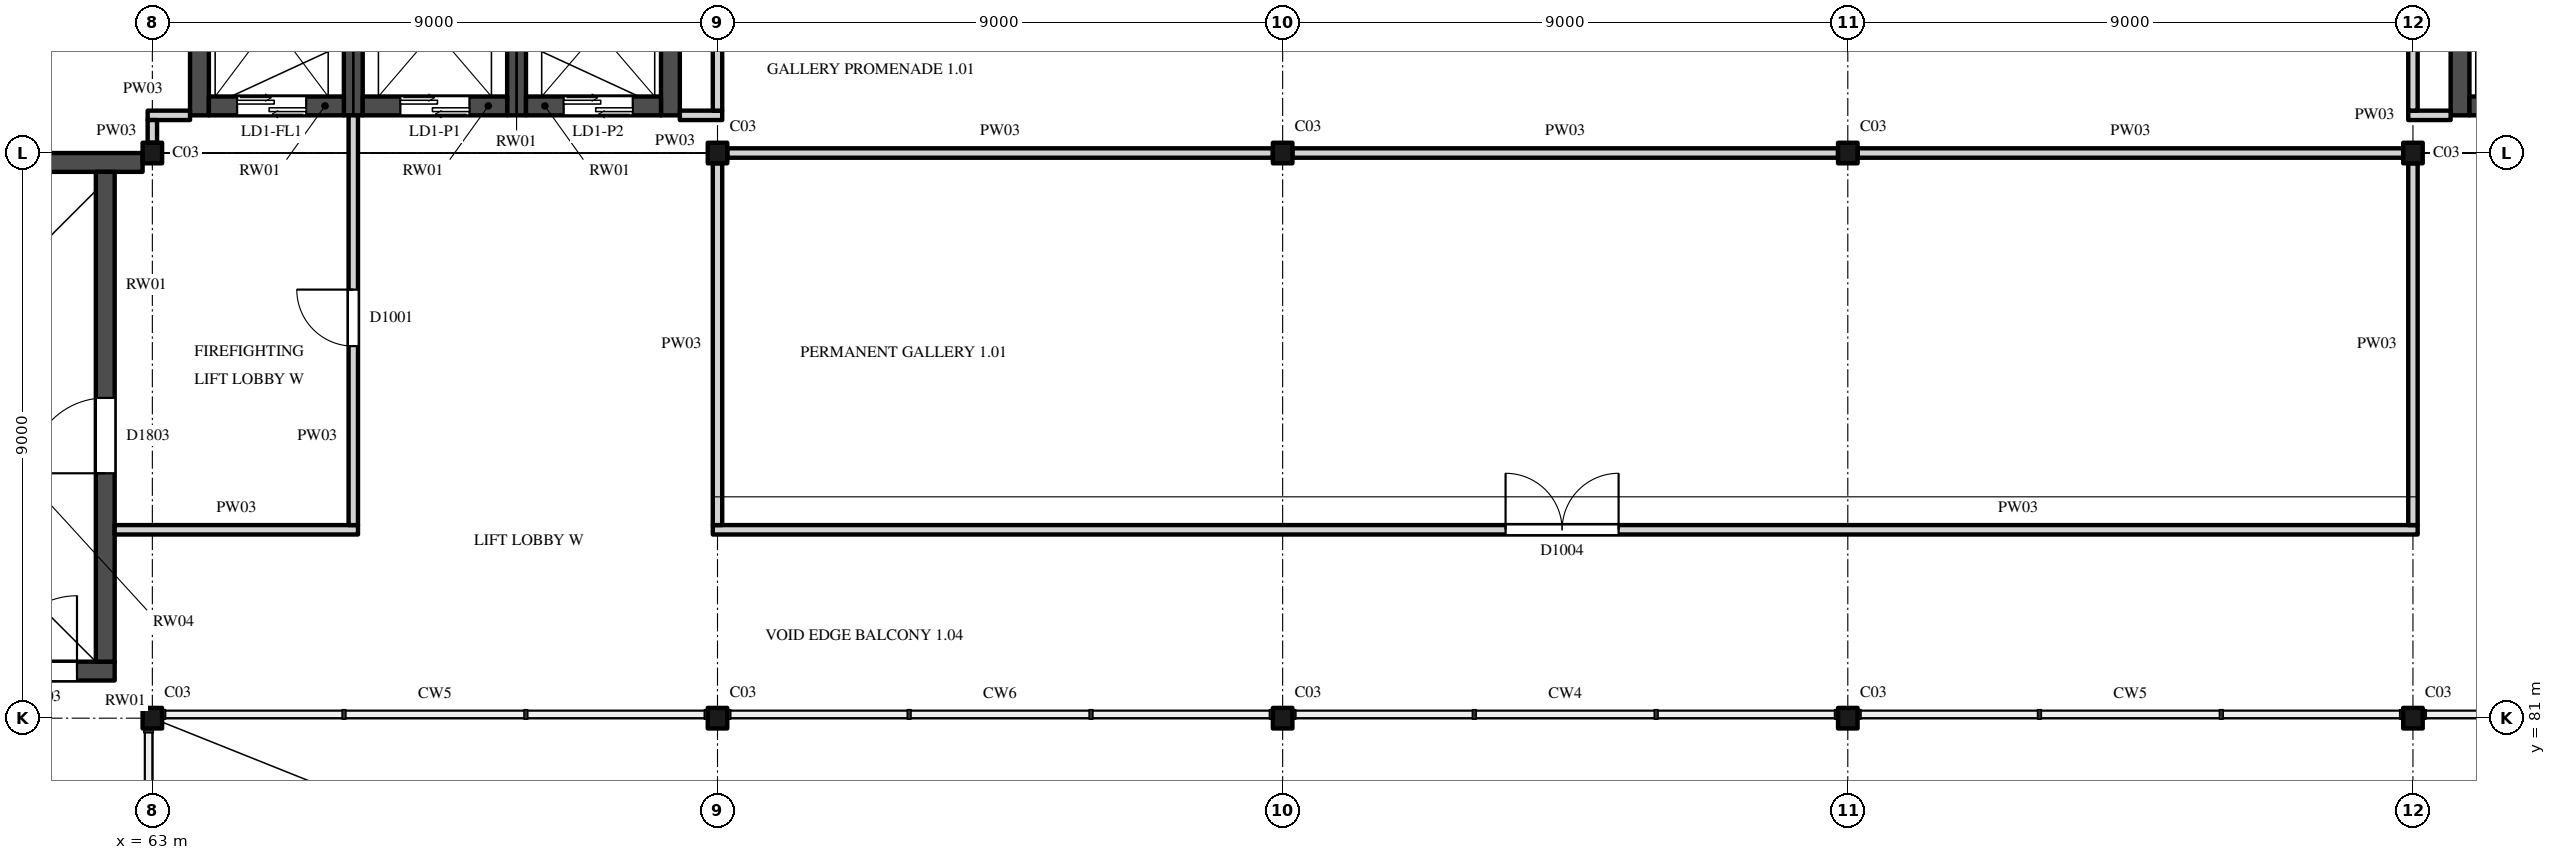
"""IFC4 building model, lengths in metres.
Left out: names, types, materials, properties, quantities, classifications, styles, units other than length and angle.
Written with IfcOpenShell. Run it as: python <this file> out.ifc"""

import sys

from ifc_helpers import new_model, si_unit, direction, frame, frame_2d, origin, origin_2d, place, context, subcontext, project, spatial, rectangle, i_section, extrude, element, fill, save


model = new_model("IFC4")
c1 = context("Model", 3, precision=1e-05, world=origin(), true_north=direction((0.0, 1.0)))
c2 = subcontext(c1, "Body", "Model", "MODEL_VIEW")
j1 = project(units=[si_unit("LENGTHUNIT", "METRE"), si_unit("PLANEANGLEUNIT", "RADIAN")], contexts=[c1])
p1 = place(None, origin())
s1 = spatial("IfcSite", under=j1, at=p1, CompositionType="ELEMENT")
p2 = place(p1, origin())
s2 = spatial("IfcBuilding", under=s1, at=p2, CompositionType="ELEMENT")
p3 = place(p2, frame((0.0, 0.0, 6.0)))
s3 = spatial("IfcBuildingStorey", under=s2, at=p3, CompositionType="ELEMENT", Elevation=6.0)
for number, where, z_axis, x_axis in (
    (1, (63.0, 81.0, 0.0), (0.0, 0.0, 1.0), (1.0, 0.0, 0.0)),
    (2, (72.0, 81.0, 0.0), (0.0, 0.0, 1.0), (1.0, 0.0, 0.0)),
    (3, (81.0, 81.0, 0.0), (0.0, 0.0, 1.0), (1.0, 0.0, 0.0)),
    (4, (90.0, 81.0, 0.0), (0.0, 0.0, 1.0), (1.0, 0.0, 0.0)),
    (5, (99.0, 81.0, 0.0), (0.0, 0.0, 1.0), (1.0, 0.0, 0.0)),
    (6, (63.0, 90.0, 0.0), (0.0, 0.0, 1.0), (1.0, 0.0, 0.0)),
    (7, (72.0, 90.0, 0.0), (0.0, 0.0, 1.0), (1.0, 0.0, 0.0)),
    (8, (81.0, 90.0, 0.0), (0.0, 0.0, 1.0), (1.0, 0.0, 0.0)),
    (9, (90.0, 90.0, 0.0), (0.0, 0.0, 1.0), (1.0, 0.0, 0.0)),
    (10, (99.0, 90.0, 0.0), (0.0, 0.0, 1.0), (1.0, 0.0, 0.0)),
):
    element("IfcColumn", number, at=place(p3, frame(where, z_axis=z_axis, x_axis=x_axis)), inside=s3, PredefinedType="COLUMN", context=c2, shape_type="SweptSolid", body=[
        extrude(i_section(OverallWidth=0.311, OverallDepth=0.327, WebThickness=0.016, FlangeThickness=0.025, FilletRadius=0.017, at=origin_2d()), origin(), (0.0, 0.0, 1.0), 5.0),
    ])
p4 = place(p3, frame((54.3, 81.75, 0.0), z_axis=(0.0, 0.0, 1.0), x_axis=(1.0, 0.0, 0.0)))
e11 = element("IfcWall", 11, at=p4, inside=s3, PredefinedType="SHEAR", context=c2, shape_type="SweptSolid", body=[
    extrude(rectangle(XDim=8.1, YDim=0.3, at=frame_2d((4.05, 0.0))), origin(), (0.0, 0.0, 1.0), 5.0),
])
p5 = place(p4, frame((6.3, 0.0, 0.0)))
e12 = element("IfcOpeningElement", 12, at=p5, cuts=e11, PredefinedType="OPENING", context=c2, shape_type="SweptSolid", body=[
    extrude(rectangle(XDim=1.2, YDim=2.1, at=frame_2d((0.6, 1.05))), frame((0.0, 0.16, 0.0), z_axis=(0.0, -1.0, 0.0), x_axis=(1.0, 0.0, 0.0)), (0.0, 0.0, 1.0), 0.32),
])
p6 = place(p3, frame((54.3, 89.85, 0.0), z_axis=(0.0, 0.0, 1.0), x_axis=(1.0, 0.0, 0.0)))
e13 = element("IfcWall", 13, at=p6, inside=s3, PredefinedType="SHEAR", context=c2, shape_type="SweptSolid", body=[
    extrude(rectangle(XDim=8.544, YDim=0.3, at=frame_2d((4.272, 0.0))), origin(), (0.0, 0.0, 1.0), 5.0),
])
p7 = place(p3, frame((62.25, 81.9, 0.0), z_axis=(0.0, 0.0, 1.0), x_axis=(0.0, 1.0, 0.0)))
e14 = element("IfcWall", 14, at=p7, inside=s3, PredefinedType="SHEAR", context=c2, shape_type="SweptSolid", body=[
    extrude(rectangle(XDim=7.8, YDim=0.3, at=frame_2d((3.9, 0.0))), origin(), (0.0, 0.0, 1.0), 5.0),
])
p8 = place(p7, frame((3.0, 0.0, 0.0)))
e15 = element("IfcOpeningElement", 15, at=p8, cuts=e14, PredefinedType="OPENING", context=c2, shape_type="SweptSolid", body=[
    extrude(rectangle(XDim=1.2, YDim=2.1, at=frame_2d((0.6, 1.05))), frame((0.0, 0.16, 0.0), z_axis=(0.0, -1.0, 0.0), x_axis=(1.0, 0.0, 0.0)), (0.0, 0.0, 1.0), 0.32),
])
for number, where, z_axis, x_axis in (
    (16, (63.75, 90.6, 0.0), (0.0, 0.0, 1.0), (0.0, 1.0, 0.0)),
    (17, (66.2, 90.6, 0.0), (0.0, 0.0, 1.0), (0.0, 1.0, 0.0)),
    (18, (68.8, 90.6, 0.0), (0.0, 0.0, 1.0), (0.0, 1.0, 0.0)),
    (19, (71.25, 90.6, 0.0), (0.0, 0.0, 1.0), (0.0, 1.0, 0.0)),
):
    element("IfcWall", number, at=place(p3, frame(where, z_axis=z_axis, x_axis=x_axis)), inside=s3, PredefinedType="SHEAR", context=c2, shape_type="SweptSolid", body=[
        extrude(rectangle(XDim=3.6, YDim=0.3, at=frame_2d((1.8, 0.0))), origin(), (0.0, 0.0, 1.0), 5.0),
    ])
p9 = place(p3, frame((63.9, 90.75, 0.0), z_axis=(0.0, 0.0, 1.0), x_axis=(1.0, 0.0, 0.0)))
e20 = element("IfcWall", 20, at=p9, inside=s3, PredefinedType="SHEAR", context=c2, shape_type="SweptSolid", body=[
    extrude(rectangle(XDim=2.15, YDim=0.3, at=frame_2d((1.075, 0.0))), origin(), (0.0, 0.0, 1.0), 5.0),
])
p10 = place(p9, frame((0.45, 0.0, 0.0)))
e21 = element("IfcOpeningElement", 21, at=p10, cuts=e20, PredefinedType="OPENING", context=c2, shape_type="SweptSolid", body=[
    extrude(rectangle(XDim=1.1, YDim=2.1, at=frame_2d((0.55, 1.05))), frame((0.0, 0.16, 0.0), z_axis=(0.0, -1.0, 0.0), x_axis=(1.0, 0.0, 0.0)), (0.0, 0.0, 1.0), 0.32),
])
p11 = place(p3, frame((66.35, 90.75, 0.0), z_axis=(0.0, 0.0, 1.0), x_axis=(1.0, 0.0, 0.0)))
e22 = element("IfcWall", 22, at=p11, inside=s3, PredefinedType="SHEAR", context=c2, shape_type="SweptSolid", body=[
    extrude(rectangle(XDim=2.3, YDim=0.3, at=frame_2d((1.15, 0.0))), origin(), (0.0, 0.0, 1.0), 5.0),
])
p12 = place(p11, frame((0.6, 0.0, 0.0)))
e23 = element("IfcOpeningElement", 23, at=p12, cuts=e22, PredefinedType="OPENING", context=c2, shape_type="SweptSolid", body=[
    extrude(rectangle(XDim=1.1, YDim=2.1, at=frame_2d((0.55, 1.05))), frame((0.0, 0.16, 0.0), z_axis=(0.0, -1.0, 0.0), x_axis=(1.0, 0.0, 0.0)), (0.0, 0.0, 1.0), 0.32),
])
p13 = place(p3, frame((68.95, 90.75, 0.0), z_axis=(0.0, 0.0, 1.0), x_axis=(1.0, 0.0, 0.0)))
e24 = element("IfcWall", 24, at=p13, inside=s3, PredefinedType="SHEAR", context=c2, shape_type="SweptSolid", body=[
    extrude(rectangle(XDim=2.15, YDim=0.3, at=frame_2d((1.075, 0.0))), origin(), (0.0, 0.0, 1.0), 5.0),
])
p14 = place(p13, frame((0.6, 0.0, 0.0)))
e25 = element("IfcOpeningElement", 25, at=p14, cuts=e24, PredefinedType="OPENING", context=c2, shape_type="SweptSolid", body=[
    extrude(rectangle(XDim=1.1, YDim=2.1, at=frame_2d((0.55, 1.05))), frame((0.0, 0.16, 0.0), z_axis=(0.0, -1.0, 0.0), x_axis=(1.0, 0.0, 0.0)), (0.0, 0.0, 1.0), 0.32),
])
p15 = place(p3, frame((99.75, 90.6, 0.0), z_axis=(0.0, 0.0, 1.0), x_axis=(0.0, 1.0, 0.0)))
e26 = element("IfcWall", 26, at=p15, inside=s3, PredefinedType="SHEAR", context=c2, shape_type="SweptSolid", body=[
    extrude(rectangle(XDim=3.6, YDim=0.3, at=frame_2d((1.8, 0.0))), origin(), (0.0, 0.0, 1.0), 5.0),
])
p16 = place(p3, frame((99.9, 90.75, 0.0), z_axis=(0.0, 0.0, 1.0), x_axis=(1.0, 0.0, 0.0)))
e27 = element("IfcWall", 27, at=p16, inside=s3, PredefinedType="SHEAR", context=c2, shape_type="SweptSolid", body=[
    extrude(rectangle(XDim=2.15, YDim=0.3, at=frame_2d((1.075, 0.0))), origin(), (0.0, 0.0, 1.0), 5.0),
])
p17 = place(p16, frame((0.45, 0.0, 0.0)))
e28 = element("IfcOpeningElement", 28, at=p17, cuts=e27, PredefinedType="OPENING", context=c2, shape_type="SweptSolid", body=[
    extrude(rectangle(XDim=1.1, YDim=2.1, at=frame_2d((0.55, 1.05))), frame((0.0, 0.16, 0.0), z_axis=(0.0, -1.0, 0.0), x_axis=(1.0, 0.0, 0.0)), (0.0, 0.0, 1.0), 0.32),
])
p18 = place(p3, frame((62.4, 84.0, 0.0), z_axis=(0.0, 0.0, 1.0), x_axis=(1.0, 0.0, 0.0)))
e29 = element("IfcWall", 29, at=p18, inside=s3, PredefinedType="PARTITIONING", context=c2, shape_type="SweptSolid", body=[
    extrude(rectangle(XDim=3.875, YDim=0.15, at=frame_2d((1.938, 0.0))), origin(), (0.0, 0.0, 1.0), 4.473),
])
p19 = place(p3, frame((71.925, 84.0, 0.0), z_axis=(0.0, 0.0, 1.0), x_axis=(1.0, 0.0, 0.0)))
e30 = element("IfcWall", 30, at=p19, inside=s3, PredefinedType="PARTITIONING", context=c2, shape_type="SweptSolid", body=[
    extrude(rectangle(XDim=27.15, YDim=0.15, at=frame_2d((13.575, 0.0))), origin(), (0.0, 0.0, 1.0), 4.473),
])
p20 = place(p19, frame((12.625, 0.0, 0.0)))
e31 = element("IfcOpeningElement", 31, at=p20, cuts=e30, PredefinedType="OPENING", context=c2, shape_type="SweptSolid", body=[
    extrude(rectangle(XDim=1.8, YDim=2.4, at=frame_2d((0.9, 1.2))), frame((0.0, 0.085, 0.0), z_axis=(0.0, -1.0, 0.0), x_axis=(1.0, 0.0, 0.0)), (0.0, 0.0, 1.0), 0.17),
])
for number, where, z_axis, x_axis in (
    (32, (72.156, 90.0, 0.0), (0.0, 0.0, 1.0), (1.0, 0.0, 0.0)),
    (33, (81.156, 90.0, 0.0), (0.0, 0.0, 1.0), (1.0, 0.0, 0.0)),
    (34, (90.156, 90.0, 0.0), (0.0, 0.0, 1.0), (1.0, 0.0, 0.0)),
):
    element("IfcWall", number, at=place(p3, frame(where, z_axis=z_axis, x_axis=x_axis)), inside=s3, PredefinedType="PARTITIONING", context=c2, shape_type="SweptSolid", body=[
        extrude(rectangle(XDim=8.689, YDim=0.15, at=frame_2d((4.344, 0.0))), origin(), (0.0, 0.0, 1.0), 4.466),
    ])
for number, where, z_axis, x_axis in (
    (35, (62.925, 90.6, 0.0), (0.0, 0.0, 1.0), (1.0, 0.0, 0.0)),
    (36, (71.4, 90.6, 0.0), (0.0, 0.0, 1.0), (1.0, 0.0, 0.0)),
    (37, (98.925, 90.6, 0.0), (0.0, 0.0, 1.0), (1.0, 0.0, 0.0)),
):
    element("IfcWall", number, at=place(p3, frame(where, z_axis=z_axis, x_axis=x_axis)), inside=s3, PredefinedType="PARTITIONING", context=c2, shape_type="SweptSolid", body=[
        extrude(rectangle(XDim=0.675, YDim=0.15, at=frame_2d((0.337, 0.0))), origin(), (0.0, 0.0, 1.0), 4.825),
    ])
p21 = place(p3, frame((63.0, 90.164, 0.0), z_axis=(0.0, 0.0, 1.0), x_axis=(0.0, 1.0, 0.0)))
e38 = element("IfcWall", 38, at=p21, inside=s3, PredefinedType="PARTITIONING", context=c2, shape_type="SweptSolid", body=[
    extrude(rectangle(XDim=0.361, YDim=0.15, at=frame_2d((0.181, 0.0))), origin(), (0.0, 0.0, 1.0), 4.825),
])
p22 = place(p3, frame((66.2, 84.075, 0.0), z_axis=(0.0, 0.0, 1.0), x_axis=(0.0, 1.0, 0.0)))
e39 = element("IfcWall", 39, at=p22, inside=s3, PredefinedType="PARTITIONING", context=c2, shape_type="SweptSolid", body=[
    extrude(rectangle(XDim=6.525, YDim=0.15, at=frame_2d((3.263, 0.0))), origin(), (0.0, 0.0, 1.0), 4.825),
])
p23 = place(p22, frame((2.85, 0.0, 0.0)))
e40 = element("IfcOpeningElement", 40, at=p23, cuts=e39, PredefinedType="OPENING", context=c2, shape_type="SweptSolid", body=[
    extrude(rectangle(XDim=0.9, YDim=2.1, at=frame_2d((0.45, 1.05))), frame((0.0, 0.085, 0.0), z_axis=(0.0, -1.0, 0.0), x_axis=(1.0, 0.0, 0.0)), (0.0, 0.0, 1.0), 0.17),
])
p24 = place(p3, frame((72.0, 84.075, 0.0), z_axis=(0.0, 0.0, 1.0), x_axis=(0.0, 1.0, 0.0)))
e41 = element("IfcWall", 41, at=p24, inside=s3, PredefinedType="PARTITIONING", context=c2, shape_type="SweptSolid", body=[
    extrude(rectangle(XDim=5.761, YDim=0.15, at=frame_2d((2.881, 0.0))), origin(), (0.0, 0.0, 1.0), 4.365),
])
p25 = place(p3, frame((72.0, 90.675, 0.0), z_axis=(0.0, 0.0, 1.0), x_axis=(0.0, 1.0, 0.0)))
e42 = element("IfcWall", 42, at=p25, inside=s3, PredefinedType="PARTITIONING", context=c2, shape_type="SweptSolid", body=[
    extrude(rectangle(XDim=8.165, YDim=0.15, at=frame_2d((4.082, 0.0))), origin(), (0.0, 0.0, 1.0), 4.365),
])
p26 = place(p3, frame((99.0, 84.075, 0.0), z_axis=(0.0, 0.0, 1.0), x_axis=(0.0, 1.0, 0.0)))
e43 = element("IfcWall", 43, at=p26, inside=s3, PredefinedType="PARTITIONING", context=c2, shape_type="SweptSolid", body=[
    extrude(rectangle(XDim=5.761, YDim=0.15, at=frame_2d((2.881, 0.0))), origin(), (0.0, 0.0, 1.0), 4.365),
])
p27 = place(p3, frame((99.0, 90.675, 0.0), z_axis=(0.0, 0.0, 1.0), x_axis=(0.0, 1.0, 0.0)))
e44 = element("IfcWall", 44, at=p27, inside=s3, PredefinedType="PARTITIONING", context=c2, shape_type="SweptSolid", body=[
    extrude(rectangle(XDim=8.165, YDim=0.15, at=frame_2d((4.082, 0.0))), origin(), (0.0, 0.0, 1.0), 4.365),
])
p28 = place(p8, origin())
e45 = element("IfcDoor", 45, at=p28, inside=s3, OperationType="SINGLE_SWING_RIGHT", PredefinedType="DOOR", context=c2, shape_type="SweptSolid", body=[
    extrude(rectangle(XDim=1.2, YDim=2.1, at=frame_2d((0.6, 1.05))), frame((0.0, 0.025, 0.0), z_axis=(0.0, -1.0, 0.0), x_axis=(1.0, 0.0, 0.0)), (0.0, 0.0, 1.0), 0.05),
])
fill(e15, e45)
p29 = place(p5, origin())
e46 = element("IfcDoor", 46, at=p29, inside=s3, OperationType="SINGLE_SWING_LEFT", PredefinedType="DOOR", context=c2, shape_type="SweptSolid", body=[
    extrude(rectangle(XDim=1.2, YDim=2.1, at=frame_2d((0.6, 1.05))), frame((0.0, 0.025, 0.0), z_axis=(0.0, -1.0, 0.0), x_axis=(1.0, 0.0, 0.0)), (0.0, 0.0, 1.0), 0.05),
])
fill(e12, e46)
p30 = place(p10, origin())
e47 = element("IfcDoor", 47, at=p30, inside=s3, OperationType="DOUBLE_DOOR_SLIDING", PredefinedType="DOOR", context=c2, shape_type="SweptSolid", body=[
    extrude(rectangle(XDim=1.1, YDim=2.1, at=frame_2d((0.55, 1.05))), frame((0.0, 0.025, 0.0), z_axis=(0.0, -1.0, 0.0), x_axis=(1.0, 0.0, 0.0)), (0.0, 0.0, 1.0), 0.05),
])
fill(e21, e47)
p31 = place(p12, origin())
e48 = element("IfcDoor", 48, at=p31, inside=s3, OperationType="DOUBLE_DOOR_SLIDING", PredefinedType="DOOR", context=c2, shape_type="SweptSolid", body=[
    extrude(rectangle(XDim=1.1, YDim=2.1, at=frame_2d((0.55, 1.05))), frame((0.0, 0.025, 0.0), z_axis=(0.0, -1.0, 0.0), x_axis=(1.0, 0.0, 0.0)), (0.0, 0.0, 1.0), 0.05),
])
fill(e23, e48)
p32 = place(p14, origin())
e49 = element("IfcDoor", 49, at=p32, inside=s3, OperationType="DOUBLE_DOOR_SLIDING", PredefinedType="DOOR", context=c2, shape_type="SweptSolid", body=[
    extrude(rectangle(XDim=1.1, YDim=2.1, at=frame_2d((0.55, 1.05))), frame((0.0, 0.025, 0.0), z_axis=(0.0, -1.0, 0.0), x_axis=(1.0, 0.0, 0.0)), (0.0, 0.0, 1.0), 0.05),
])
fill(e25, e49)
p33 = place(p23, origin())
e50 = element("IfcDoor", 50, at=p33, inside=s3, OperationType="SINGLE_SWING_LEFT", PredefinedType="DOOR", context=c2, shape_type="SweptSolid", body=[
    extrude(rectangle(XDim=0.9, YDim=2.1, at=frame_2d((0.45, 1.05))), frame((0.0, 0.025, 0.0), z_axis=(0.0, -1.0, 0.0), x_axis=(1.0, 0.0, 0.0)), (0.0, 0.0, 1.0), 0.05),
])
fill(e40, e50)
p34 = place(p20, origin())
e51 = element("IfcDoor", 51, at=p34, inside=s3, OperationType="DOUBLE_DOOR_SINGLE_SWING", PredefinedType="DOOR", context=c2, shape_type="SweptSolid", body=[
    extrude(rectangle(XDim=1.8, YDim=2.4, at=frame_2d((0.9, 1.2))), frame((0.0, 0.025, 0.0), z_axis=(0.0, -1.0, 0.0), x_axis=(1.0, 0.0, 0.0)), (0.0, 0.0, 1.0), 0.05),
])
fill(e31, e51)
save(model, sys.argv[1])
